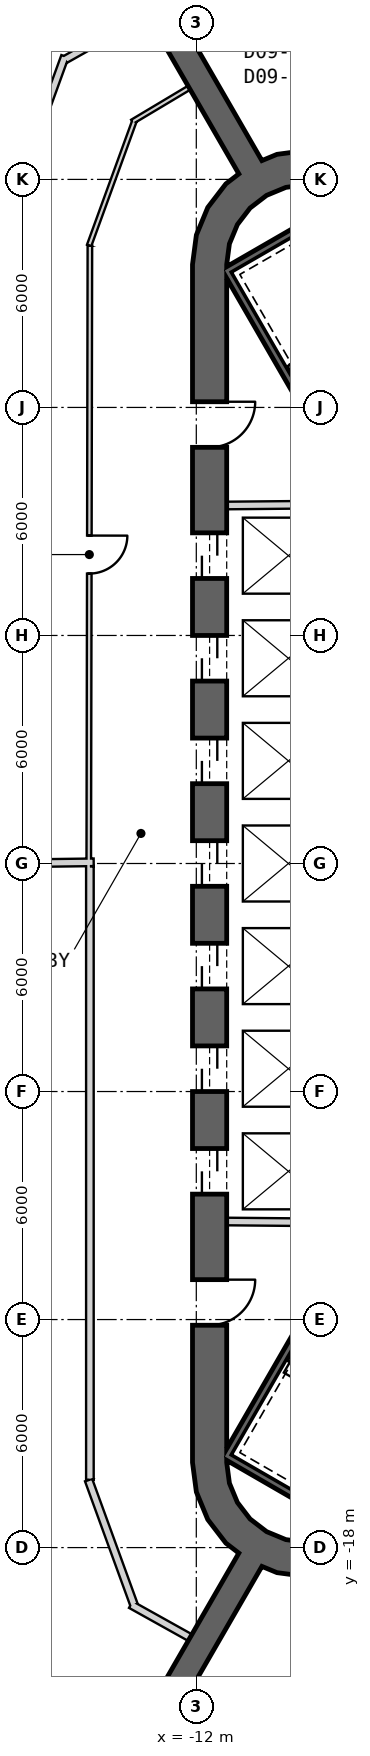
"""IFC4 building model, lengths in metres.
Left out: names, types, materials, properties, quantities, classifications, styles, units other than length and angle.
Written with IfcOpenShell. Run it as: python <this file> out.ifc"""

import sys

from ifc_helpers import new_model, si_unit, direction, frame, frame_2d, origin, place, context, subcontext, project, spatial, polyline, rectangle, outline, extrude, element, fill, save


model = new_model("IFC4")
c1 = context("Model", 3, precision=1e-05, world=origin(), true_north=direction((0.0, 1.0)))
c2 = subcontext(c1, "Body", "Model", "MODEL_VIEW")
j1 = project(units=[si_unit("LENGTHUNIT", "METRE"), si_unit("PLANEANGLEUNIT", "RADIAN")], contexts=[c1])
p1 = place(None, origin())
s1 = spatial("IfcSite", under=j1, at=p1, CompositionType="ELEMENT")
p2 = place(p1, origin())
s2 = spatial("IfcBuilding", under=s1, at=p2, CompositionType="ELEMENT")
p3 = place(p2, frame((0.0, 0.0, 205.2)))
s3 = spatial("IfcBuildingStorey", under=s2, at=p3, CompositionType="ELEMENT", Elevation=205.2)
p4 = place(p3, frame((-11.65, 15.762, 0.0), z_axis=(0.0, 0.0, 1.0), x_axis=(0.0, -1.0, 0.0)))
e1 = element("IfcWall", 1, at=p4, inside=s3, PredefinedType="SHEAR", context=c2, shape_type="SweptSolid", body=[
    extrude(rectangle(XDim=31.523, YDim=0.9, at=frame_2d((15.762, 0.0))), origin(), (0.0, 0.0, 1.0), 4.0),
])
p5 = place(p4, frame((7.062, 0.0, 0.0)))
e2 = element("IfcOpeningElement", 2, at=p5, cuts=e1, PredefinedType="OPENING", context=c2, shape_type="SweptSolid", body=[
    extrude(rectangle(XDim=1.2, YDim=2.4, at=frame_2d((0.6, 1.2))), frame((0.0, 0.46, 0.0), z_axis=(0.0, -1.0, 0.0), x_axis=(1.0, 0.0, 0.0)), (0.0, 0.0, 1.0), 0.92),
])
p6 = place(p4, frame((9.762, 0.0, 0.0)))
e3 = element("IfcOpeningElement", 3, at=p6, cuts=e1, PredefinedType="OPENING", context=c2, shape_type="SweptSolid", body=[
    extrude(rectangle(XDim=1.2, YDim=2.4, at=frame_2d((0.6, 1.2))), frame((0.0, 0.46, 0.0), z_axis=(0.0, -1.0, 0.0), x_axis=(1.0, 0.0, 0.0)), (0.0, 0.0, 1.0), 0.92),
])
p7 = place(p4, frame((12.462, 0.0, 0.0)))
e4 = element("IfcOpeningElement", 4, at=p7, cuts=e1, PredefinedType="OPENING", context=c2, shape_type="SweptSolid", body=[
    extrude(rectangle(XDim=1.2, YDim=2.4, at=frame_2d((0.6, 1.2))), frame((0.0, 0.46, 0.0), z_axis=(0.0, -1.0, 0.0), x_axis=(1.0, 0.0, 0.0)), (0.0, 0.0, 1.0), 0.92),
])
p8 = place(p4, frame((15.162, 0.0, 0.0)))
e5 = element("IfcOpeningElement", 5, at=p8, cuts=e1, PredefinedType="OPENING", context=c2, shape_type="SweptSolid", body=[
    extrude(rectangle(XDim=1.2, YDim=2.4, at=frame_2d((0.6, 1.2))), frame((0.0, 0.46, 0.0), z_axis=(0.0, -1.0, 0.0), x_axis=(1.0, 0.0, 0.0)), (0.0, 0.0, 1.0), 0.92),
])
p9 = place(p4, frame((17.862, 0.0, 0.0)))
e6 = element("IfcOpeningElement", 6, at=p9, cuts=e1, PredefinedType="OPENING", context=c2, shape_type="SweptSolid", body=[
    extrude(rectangle(XDim=1.2, YDim=2.4, at=frame_2d((0.6, 1.2))), frame((0.0, 0.46, 0.0), z_axis=(0.0, -1.0, 0.0), x_axis=(1.0, 0.0, 0.0)), (0.0, 0.0, 1.0), 0.92),
])
p10 = place(p4, frame((20.562, 0.0, 0.0)))
e7 = element("IfcOpeningElement", 7, at=p10, cuts=e1, PredefinedType="OPENING", context=c2, shape_type="SweptSolid", body=[
    extrude(rectangle(XDim=1.2, YDim=2.4, at=frame_2d((0.6, 1.2))), frame((0.0, 0.46, 0.0), z_axis=(0.0, -1.0, 0.0), x_axis=(1.0, 0.0, 0.0)), (0.0, 0.0, 1.0), 0.92),
])
p11 = place(p4, frame((23.262, 0.0, 0.0)))
e8 = element("IfcOpeningElement", 8, at=p11, cuts=e1, PredefinedType="OPENING", context=c2, shape_type="SweptSolid", body=[
    extrude(rectangle(XDim=1.2, YDim=2.4, at=frame_2d((0.6, 1.2))), frame((0.0, 0.46, 0.0), z_axis=(0.0, -1.0, 0.0), x_axis=(1.0, 0.0, 0.0)), (0.0, 0.0, 1.0), 0.92),
])
p12 = place(p4, frame((3.612, 0.0, 0.0)))
e9 = element("IfcOpeningElement", 9, at=p12, cuts=e1, PredefinedType="OPENING", context=c2, shape_type="SweptSolid", body=[
    extrude(rectangle(XDim=1.2, YDim=2.4, at=frame_2d((0.6, 1.2))), frame((0.0, 0.46, 0.0), z_axis=(0.0, -1.0, 0.0), x_axis=(1.0, 0.0, 0.0)), (0.0, 0.0, 1.0), 0.92),
])
p13 = place(p4, frame((26.712, 0.0, 0.0)))
e10 = element("IfcOpeningElement", 10, at=p13, cuts=e1, PredefinedType="OPENING", context=c2, shape_type="SweptSolid", body=[
    extrude(rectangle(XDim=1.2, YDim=2.4, at=frame_2d((0.6, 1.2))), frame((0.0, 0.46, 0.0), z_axis=(0.0, -1.0, 0.0), x_axis=(1.0, 0.0, 0.0)), (0.0, 0.0, 1.0), 0.92),
])
p14 = place(p3, origin())
e11 = element("IfcWall", 11, at=p14, inside=s3, PredefinedType="SHEAR", context=c2, shape_type="SweptSolid", body=[
    extrude(outline(polyline([(-7.6, 18.36), (-8.323, 18.659), (-9.1, 18.762), (-9.876, 18.659), (-10.6, 18.36), (-11.221, 17.883), (-11.698, 17.262), (-11.998, 16.538), (-12.1, 15.762), (-11.2, 15.762), (-11.128, 16.305), (-10.919, 16.812), (-10.585, 17.247), (-10.15, 17.58), (-9.644, 17.79), (-9.1, 17.862), (-8.556, 17.79), (-8.05, 17.58), (-7.6, 18.36)])), origin(), (0.0, 0.0, 1.0), 4.0),
])
p15 = place(p3, origin())
e12 = element("IfcWall", 12, at=p15, inside=s3, PredefinedType="SHEAR", context=c2, shape_type="SweptSolid", body=[
    extrude(outline(polyline([(-12.1, -15.762), (-11.998, -16.538), (-11.698, -17.262), (-11.221, -17.883), (-10.6, -18.36), (-9.876, -18.659), (-9.1, -18.762), (-8.323, -18.659), (-7.6, -18.36), (-8.05, -17.58), (-8.556, -17.79), (-9.1, -17.862), (-9.644, -17.79), (-10.15, -17.58), (-10.585, -17.247), (-10.919, -16.812), (-11.128, -16.305), (-11.2, -15.762), (-12.1, -15.762)])), origin(), (0.0, 0.0, 1.0), 4.0),
])
for number, where, z_axis, x_axis in (
    (13, (-10.575, 18.316, 0.0), (0.0, 0.0, 1.0), (-0.5, 0.866, 0.0)),
    (14, (-10.575, -18.316, 0.0), (0.0, 0.0, 1.0), (-0.5, -0.866, 0.0)),
):
    element("IfcWall", number, at=place(p3, frame(where, z_axis=z_axis, x_axis=x_axis)), inside=s3, PredefinedType="SHEAR", context=c2, shape_type="SweptSolid", body=[
        extrude(rectangle(XDim=11.794, YDim=0.7, at=frame_2d((5.897, 0.0))), origin(), (0.0, 0.0, 1.0), 4.0),
    ])
p16 = place(p3, frame((-11.2, 9.42, 0.0), z_axis=(0.0, 0.0, 1.0), x_axis=(0.999957167047, 0.009255488683, 0.0)))
e15 = element("IfcWall", 15, at=p16, inside=s3, PredefinedType="PLUMBINGWALL", context=c2, shape_type="SweptSolid", body=[
    extrude(rectangle(XDim=3.35, YDim=0.2, at=frame_2d((1.675, 0.0))), origin(), (0.0, 0.0, 1.0), 3.7),
])
p17 = place(p3, frame((-8.05, -9.449, 0.0), z_axis=(0.0, 0.0, 1.0), x_axis=(-0.999957467379, 0.009222983926, 0.0)))
e16 = element("IfcWall", 16, at=p17, inside=s3, PredefinedType="PLUMBINGWALL", context=c2, shape_type="SweptSolid", body=[
    extrude(rectangle(XDim=3.15, YDim=0.2, at=frame_2d((1.575, 0.0))), origin(), (0.0, 0.0, 1.0), 3.7),
])
p18 = place(p3, frame((-11.245, 15.678, -0.3), z_axis=(0.0, 0.0, 1.0), x_axis=(0.499977274689, -0.866038523851, 0.0)))
e17 = element("IfcWall", 17, at=p18, inside=s3, PredefinedType="SHEAR", context=c2, shape_type="SweptSolid", body=[
    extrude(rectangle(XDim=8.1, YDim=0.2, at=frame_2d((4.05, 0.0))), origin(), (0.0, 0.0, 1.0), 4.0),
])
for number, where, z_axis, x_axis in (
    (18, (-7.818, 17.541, -0.3), (0.0, 0.0, 1.0), (-0.866, -0.5, 0.0)),
    (19, (-11.282, -15.541, -0.3), (0.0, 0.0, 1.0), (0.866, -0.5, 0.0)),
):
    element("IfcWall", number, at=place(p3, frame(where, z_axis=z_axis, x_axis=x_axis)), inside=s3, PredefinedType="SHEAR", context=c2, shape_type="SweptSolid", body=[
        extrude(rectangle(XDim=3.8, YDim=0.2, at=frame_2d((1.9, 0.0))), origin(), (0.0, 0.0, 1.0), 4.0),
    ])
p19 = place(p3, frame((-7.196, -8.663, -0.3), z_axis=(0.0, 0.0, 1.0), x_axis=(-0.499997992926, -0.866026562566, 0.0)))
e20 = element("IfcWall", 20, at=p19, inside=s3, PredefinedType="SHEAR", context=c2, shape_type="SweptSolid", body=[
    extrude(rectangle(XDim=7.9, YDim=0.2, at=frame_2d((3.95, 0.0))), origin(), (0.0, 0.0, 1.0), 4.0),
])
p20 = place(p3, frame((-12.189, 20.411, 0.0), z_axis=(0.0, 0.0, 1.0), x_axis=(-0.858492721014, -0.51282574815, 0.0)))
e21 = element("IfcWall", 21, at=p20, inside=s3, PredefinedType="PARTITIONING", context=c2, shape_type="SweptSolid", body=[
    extrude(rectangle(XDim=1.742, YDim=0.12, at=frame_2d((0.871, 0.0))), origin(), (0.0, 0.0, 1.0), 3.7),
])
p21 = place(p3, frame((-13.631, 19.53, 0.0), z_axis=(0.0, 0.0, 1.0), x_axis=(-0.342069878069, -0.939674517329, 0.0)))
e22 = element("IfcWall", 22, at=p21, inside=s3, PredefinedType="PARTITIONING", context=c2, shape_type="SweptSolid", body=[
    extrude(rectangle(XDim=3.479, YDim=0.12, at=frame_2d((1.739, 0.0))), origin(), (0.0, 0.0, 1.0), 2.78),
])
p22 = place(p3, frame((-14.8, 16.257, 0.0), z_axis=(0.0, 0.0, 1.0), x_axis=(-0.001847148781, -0.999998294019, 0.0)))
e23 = element("IfcWall", 23, at=p22, inside=s3, PredefinedType="PARTITIONING", context=c2, shape_type="SweptSolid", body=[
    extrude(rectangle(XDim=16.257, YDim=0.12, at=frame_2d((8.128, 0.0))), origin(), (0.0, 0.0, 1.0), 2.88),
])
p23 = place(p22, frame((7.629, 0.0, 0.0)))
e24 = element("IfcOpeningElement", 24, at=p23, cuts=e23, PredefinedType="OPENING", context=c2, shape_type="SweptSolid", body=[
    extrude(rectangle(XDim=1.0, YDim=2.1, at=frame_2d((0.5, 1.05))), frame((0.0, 0.07, 0.0), z_axis=(0.0, -1.0, 0.0), x_axis=(1.0, 0.0, 0.0)), (0.0, 0.0, 1.0), 0.14),
])
p24 = place(p3, frame((-17.2, -0.001, 0.0), z_axis=(0.0, 0.0, 1.0), x_axis=(0.999915662945, 0.012987185857, 0.0)))
e25 = element("IfcWall", 25, at=p24, inside=s3, PredefinedType="PARTITIONING", context=c2, shape_type="SweptSolid", body=[
    extrude(rectangle(XDim=2.5, YDim=0.2, at=frame_2d((1.25, 0.0))), origin(), (0.0, 0.0, 1.0), 3.07),
])
p25 = place(p3, frame((-15.456, 21.239, 0.0), z_axis=(0.0, 0.0, 1.0), x_axis=(-0.34205546997, -0.939679762187, 0.0)))
e26 = element("IfcWall", 26, at=p25, inside=s3, PredefinedType="PARTITIONING", context=c2, shape_type="SweptSolid", body=[
    extrude(rectangle(XDim=4.706, YDim=0.2, at=frame_2d((2.353, 0.0))), origin(), (0.0, 0.0, 1.0), 2.78),
])
p26 = place(p3, frame((-13.313, 22.359, 0.0), z_axis=(0.0, 0.0, 1.0), x_axis=(-0.87121710687, -0.490897904555, 0.0)))
e27 = element("IfcWall", 27, at=p26, inside=s3, PredefinedType="PARTITIONING", context=c2, shape_type="SweptSolid", body=[
    extrude(rectangle(XDim=2.457, YDim=0.2, at=frame_2d((1.229, 0.0))), origin(), (0.0, 0.0, 1.0), 3.7),
])
p27 = place(p3, frame((-13.722, -19.499, 0.0), z_axis=(0.0, 0.0, 1.0), x_axis=(0.873381780332, -0.487036205824, 0.0)))
e28 = element("IfcWall", 28, at=p27, inside=s3, PredefinedType="PARTITIONING", context=c2, shape_type="SweptSolid", body=[
    extrude(rectangle(XDim=1.785, YDim=0.2, at=frame_2d((0.892, 0.0))), origin(), (0.0, 0.0, 1.0), 3.7),
])
p28 = place(p3, frame((-14.834, -16.223, 0.0), z_axis=(0.0, 0.0, 1.0), x_axis=(0.342017717312, -0.939693503779, 0.0)))
e29 = element("IfcWall", 29, at=p28, inside=s3, PredefinedType="PARTITIONING", context=c2, shape_type="SweptSolid", body=[
    extrude(rectangle(XDim=3.497, YDim=0.2, at=frame_2d((1.749, 0.0))), origin(), (0.0, 0.0, 1.0), 2.78),
])
p29 = place(p3, frame((-14.8, -0.07, 0.0), z_axis=(0.0, 0.0, 1.0), x_axis=(0.0, -1.0, 0.0)))
e30 = element("IfcWall", 30, at=p29, inside=s3, PredefinedType="PARTITIONING", context=c2, shape_type="SweptSolid", body=[
    extrude(rectangle(XDim=16.147, YDim=0.2, at=frame_2d((8.073, 0.0))), origin(), (0.0, 0.0, 1.0), 2.88),
])
p30 = place(p23, origin())
e31 = element("IfcDoor", 31, at=p30, inside=s3, OperationType="SINGLE_SWING_LEFT", PredefinedType="NOTDEFINED", context=c2, shape_type="SweptSolid", body=[
    extrude(rectangle(XDim=1.0, YDim=2.1, at=frame_2d((0.5, 1.05))), frame((0.0, 0.025, 0.0), z_axis=(0.0, -1.0, 0.0), x_axis=(1.0, 0.0, 0.0)), (0.0, 0.0, 1.0), 0.05),
])
fill(e24, e31)
p31 = place(p5, origin())
e32 = element("IfcDoor", 32, at=p31, inside=s3, OperationType="SLIDING_TO_LEFT", PredefinedType="USERDEFINED", context=c2, shape_type="SweptSolid", body=[
    extrude(rectangle(XDim=1.2, YDim=2.4, at=frame_2d((0.6, 1.2))), frame((0.0, 0.025, 0.0), z_axis=(0.0, -1.0, 0.0), x_axis=(1.0, 0.0, 0.0)), (0.0, 0.0, 1.0), 0.05),
])
fill(e2, e32)
p32 = place(p6, origin())
e33 = element("IfcDoor", 33, at=p32, inside=s3, OperationType="SLIDING_TO_LEFT", PredefinedType="USERDEFINED", context=c2, shape_type="SweptSolid", body=[
    extrude(rectangle(XDim=1.2, YDim=2.4, at=frame_2d((0.6, 1.2))), frame((0.0, 0.025, 0.0), z_axis=(0.0, -1.0, 0.0), x_axis=(1.0, 0.0, 0.0)), (0.0, 0.0, 1.0), 0.05),
])
fill(e3, e33)
p33 = place(p7, origin())
e34 = element("IfcDoor", 34, at=p33, inside=s3, OperationType="SLIDING_TO_LEFT", PredefinedType="USERDEFINED", context=c2, shape_type="SweptSolid", body=[
    extrude(rectangle(XDim=1.2, YDim=2.4, at=frame_2d((0.6, 1.2))), frame((0.0, 0.025, 0.0), z_axis=(0.0, -1.0, 0.0), x_axis=(1.0, 0.0, 0.0)), (0.0, 0.0, 1.0), 0.05),
])
fill(e4, e34)
p34 = place(p8, origin())
e35 = element("IfcDoor", 35, at=p34, inside=s3, OperationType="SLIDING_TO_LEFT", PredefinedType="USERDEFINED", context=c2, shape_type="SweptSolid", body=[
    extrude(rectangle(XDim=1.2, YDim=2.4, at=frame_2d((0.6, 1.2))), frame((0.0, 0.025, 0.0), z_axis=(0.0, -1.0, 0.0), x_axis=(1.0, 0.0, 0.0)), (0.0, 0.0, 1.0), 0.05),
])
fill(e5, e35)
p35 = place(p9, origin())
e36 = element("IfcDoor", 36, at=p35, inside=s3, OperationType="SLIDING_TO_LEFT", PredefinedType="USERDEFINED", context=c2, shape_type="SweptSolid", body=[
    extrude(rectangle(XDim=1.2, YDim=2.4, at=frame_2d((0.6, 1.2))), frame((0.0, 0.025, 0.0), z_axis=(0.0, -1.0, 0.0), x_axis=(1.0, 0.0, 0.0)), (0.0, 0.0, 1.0), 0.05),
])
fill(e6, e36)
p36 = place(p10, origin())
e37 = element("IfcDoor", 37, at=p36, inside=s3, OperationType="SLIDING_TO_LEFT", PredefinedType="USERDEFINED", context=c2, shape_type="SweptSolid", body=[
    extrude(rectangle(XDim=1.2, YDim=2.4, at=frame_2d((0.6, 1.2))), frame((0.0, 0.025, 0.0), z_axis=(0.0, -1.0, 0.0), x_axis=(1.0, 0.0, 0.0)), (0.0, 0.0, 1.0), 0.05),
])
fill(e7, e37)
p37 = place(p11, origin())
e38 = element("IfcDoor", 38, at=p37, inside=s3, OperationType="SLIDING_TO_LEFT", PredefinedType="USERDEFINED", context=c2, shape_type="SweptSolid", body=[
    extrude(rectangle(XDim=1.2, YDim=2.4, at=frame_2d((0.6, 1.2))), frame((0.0, 0.025, 0.0), z_axis=(0.0, -1.0, 0.0), x_axis=(1.0, 0.0, 0.0)), (0.0, 0.0, 1.0), 0.05),
])
fill(e8, e38)
p38 = place(p12, origin())
e39 = element("IfcDoor", 39, at=p38, inside=s3, OperationType="SINGLE_SWING_LEFT", PredefinedType="USERDEFINED", context=c2, shape_type="SweptSolid", body=[
    extrude(rectangle(XDim=1.2, YDim=2.4, at=frame_2d((0.6, 1.2))), frame((0.0, 0.025, 0.0), z_axis=(0.0, -1.0, 0.0), x_axis=(1.0, 0.0, 0.0)), (0.0, 0.0, 1.0), 0.05),
])
fill(e9, e39)
p39 = place(p13, origin())
e40 = element("IfcDoor", 40, at=p39, inside=s3, OperationType="SINGLE_SWING_RIGHT", PredefinedType="USERDEFINED", context=c2, shape_type="SweptSolid", body=[
    extrude(rectangle(XDim=1.2, YDim=2.4, at=frame_2d((0.6, 1.2))), frame((0.0, 0.025, 0.0), z_axis=(0.0, -1.0, 0.0), x_axis=(1.0, 0.0, 0.0)), (0.0, 0.0, 1.0), 0.05),
])
fill(e10, e40)
save(model, sys.argv[1])
